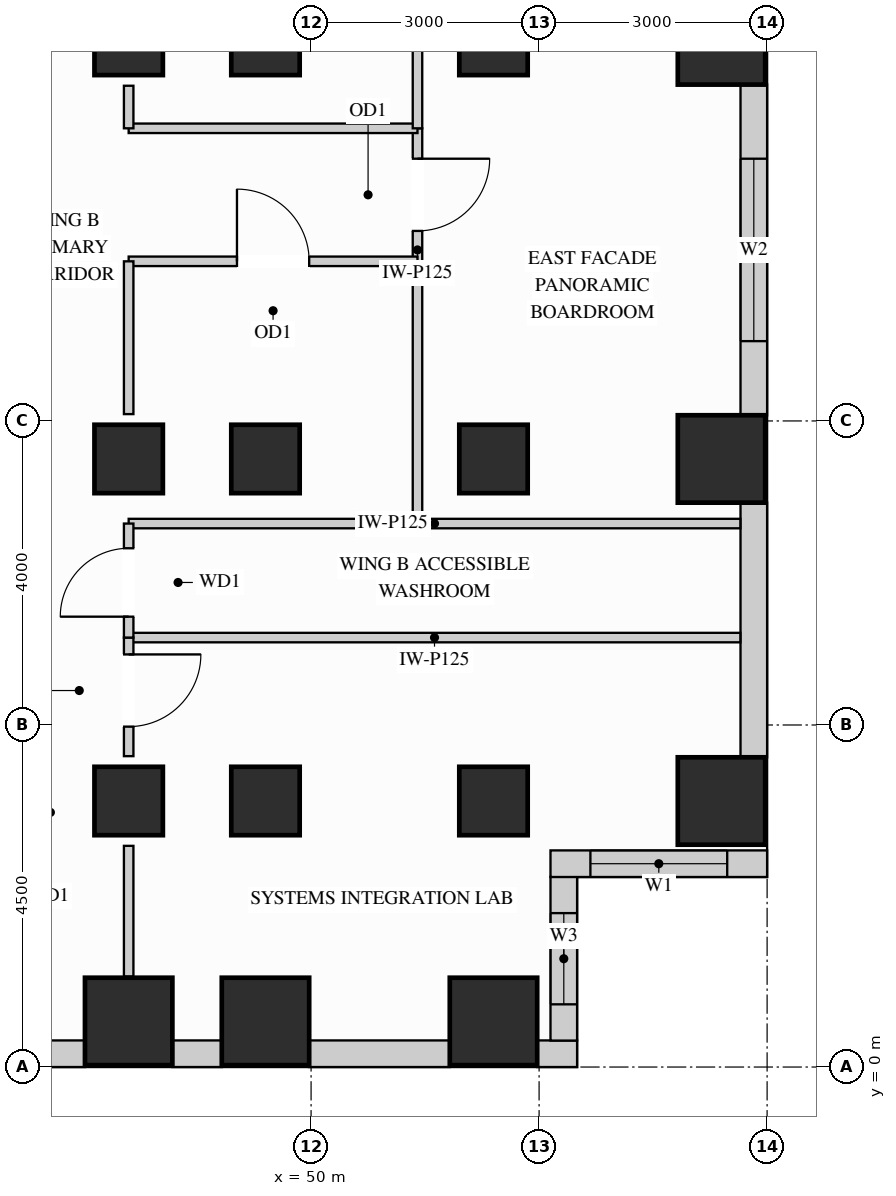
"""IFC4 building model, lengths in metres.
Left out: names, types, materials, properties, quantities, classifications, styles, units other than length and angle.
Written with IfcOpenShell. Run it as: python <this file> out.ifc"""

import sys

from ifc_helpers import new_model, si_unit, direction, frame, frame_2d, origin, origin_2d, place, context, subcontext, project, spatial, rectangle, extrude, source, transform, mapped, element, fill, save


model = new_model("IFC4")
c1 = context("Model", 3, precision=1e-05, world=origin(), true_north=direction((0.0, 1.0)))
c2 = subcontext(c1, "Body", "Model", "MODEL_VIEW")
j1 = project(units=[si_unit("LENGTHUNIT", "METRE"), si_unit("PLANEANGLEUNIT", "RADIAN")], contexts=[c1])
p1 = place(None, origin())
s1 = spatial("IfcSite", under=j1, at=p1, CompositionType="ELEMENT")
p2 = place(p1, origin())
s2 = spatial("IfcBuilding", under=s1, at=p2, CompositionType="ELEMENT")
p3 = place(p2, frame((0.0, 0.0, 127.8)))
s3 = spatial("IfcBuildingStorey", under=s2, at=p3, CompositionType="ELEMENT", Elevation=127.8)
m1 = source(origin(), c2, "Body", "SweptSolid", [
    extrude(rectangle(XDim=0.9, YDim=0.9, at=origin_2d()), origin(), (0.0, 0.0, 1.0), 3.38),
])
for number, where, z_axis, x_axis in (
    (1, (47.6, 13.5, 0.0), (0.0, 0.0, 1.0), (1.0, 0.0, 0.0)),
    (2, (47.6, 3.5, 0.0), (0.0, 0.0, 1.0), (1.0, 0.0, 0.0)),
    (3, (47.6, 8.0, 0.0), (0.0, 0.0, 1.0), (1.0, 0.0, 0.0)),
    (4, (49.4, 13.5, 0.0), (0.0, 0.0, 1.0), (1.0, 0.0, 0.0)),
    (5, (49.4, 3.5, 0.0), (0.0, 0.0, 1.0), (1.0, 0.0, 0.0)),
    (6, (49.4, 8.0, 0.0), (0.0, 0.0, 1.0), (1.0, 0.0, 0.0)),
    (7, (52.4, 13.5, 0.0), (0.0, 0.0, 1.0), (1.0, 0.0, 0.0)),
    (8, (52.4, 3.5, 0.0), (0.0, 0.0, 1.0), (1.0, 0.0, 0.0)),
    (9, (52.4, 8.0, 0.0), (0.0, 0.0, 1.0), (1.0, 0.0, 0.0)),
):
    element("IfcColumn", number, at=place(p3, frame(where, z_axis=z_axis, x_axis=x_axis)), inside=s3, PredefinedType="COLUMN", context=c2, shape_type="MappedRepresentation", body=[
        mapped(m1, transform((0.0, 0.0, 0.0), x_axis=(1.0, 0.0, 0.0), y_axis=(0.0, 1.0, 0.0), z_axis=(0.0, 0.0, 1.0))),
    ])
m2 = source(origin(), c2, "Body", "SweptSolid", [
    extrude(rectangle(XDim=1.15, YDim=1.15, at=origin_2d()), origin(), (0.0, 0.0, 1.0), 3.38),
])
for number, where, z_axis, x_axis in (
    (10, (55.4, 13.5, 0.0), (0.0, 0.0, 1.0), (1.0, 0.0, 0.0)),
    (11, (55.4, 3.5, 0.0), (0.0, 0.0, 1.0), (1.0, 0.0, 0.0)),
    (12, (55.4, 8.0, 0.0), (0.0, 0.0, 1.0), (1.0, 0.0, 0.0)),
    (13, (47.6, 0.6, 0.0), (0.0, 0.0, 1.0), (1.0, 0.0, 0.0)),
    (14, (49.4, 0.6, 0.0), (0.0, 0.0, 1.0), (1.0, 0.0, 0.0)),
    (15, (52.4, 0.6, 0.0), (0.0, 0.0, 1.0), (1.0, 0.0, 0.0)),
):
    element("IfcColumn", number, at=place(p3, frame(where, z_axis=z_axis, x_axis=x_axis)), inside=s3, PredefinedType="COLUMN", context=c2, shape_type="MappedRepresentation", body=[
        mapped(m2, transform((0.0, 0.0, 0.0), x_axis=(1.0, 0.0, 0.0), y_axis=(0.0, 1.0, 0.0), z_axis=(0.0, 0.0, 1.0))),
    ])
p4 = place(p3, frame((40.573, 0.175, 0.0), z_axis=(0.0, 0.0, 1.0), x_axis=(1.0, 0.0, 0.0)))
e16 = element("IfcWall", 16, at=p4, inside=s3, PredefinedType="SOLIDWALL", context=c2, shape_type="SweptSolid", body=[
    extrude(rectangle(XDim=6.454, YDim=0.35, at=frame_2d((3.227, 0.0))), origin(), (0.0, 0.0, 1.0), 3.365),
])
p5 = place(p4, frame((0.712, 0.0, 0.78)))
e17 = element("IfcOpeningElement", 17, at=p5, cuts=e16, PredefinedType="OPENING", context=c2, shape_type="SweptSolid", body=[
    extrude(rectangle(XDim=1.8, YDim=2.1, at=frame_2d((0.9, 1.05))), frame((0.0, 0.185, 0.0), z_axis=(0.0, -1.0, 0.0), x_axis=(1.0, 0.0, 0.0)), (0.0, 0.0, 1.0), 0.37),
])
p6 = place(p4, frame((2.905, 0.0, 0.78)))
e18 = element("IfcOpeningElement", 18, at=p6, cuts=e16, PredefinedType="OPENING", context=c2, shape_type="SweptSolid", body=[
    extrude(rectangle(XDim=1.8, YDim=2.1, at=frame_2d((0.9, 1.05))), frame((0.0, 0.185, 0.0), z_axis=(0.0, -1.0, 0.0), x_axis=(1.0, 0.0, 0.0)), (0.0, 0.0, 1.0), 0.37),
])
m3 = source(origin(), c2, "Body", "SweptSolid", [
    extrude(rectangle(XDim=0.654, YDim=0.35, at=frame_2d((0.327, 0.0))), origin(), (0.0, 0.0, 1.0), 3.365),
])
p7 = place(p3, frame((48.173, 0.175, 0.0), z_axis=(0.0, 0.0, 1.0), x_axis=(1.0, 0.0, 0.0)))
e19 = element("IfcWall", 19, at=p7, inside=s3, PredefinedType="SOLIDWALL", context=c2, shape_type="MappedRepresentation", body=[
    mapped(m3, transform((0.0, 0.0, 0.0), x_axis=(1.0, 0.0, 0.0), y_axis=(0.0, 1.0, 0.0), z_axis=(0.0, 0.0, 1.0))),
])
m4 = source(origin(), c2, "Body", "SweptSolid", [
    extrude(rectangle(XDim=1.854, YDim=0.35, at=frame_2d((0.927, 0.0))), origin(), (0.0, 0.0, 1.0), 3.365),
])
p8 = place(p3, frame((49.973, 0.175, 0.0), z_axis=(0.0, 0.0, 1.0), x_axis=(1.0, 0.0, 0.0)))
e20 = element("IfcWall", 20, at=p8, inside=s3, PredefinedType="SOLIDWALL", context=c2, shape_type="MappedRepresentation", body=[
    mapped(m4, transform((0.0, 0.0, 0.0), x_axis=(1.0, 0.0, 0.0), y_axis=(0.0, 1.0, 0.0), z_axis=(0.0, 0.0, 1.0))),
])
m5 = source(origin(), c2, "Body", "SweptSolid", [
    extrude(rectangle(XDim=0.527, YDim=0.35, at=frame_2d((0.264, 0.0))), origin(), (0.0, 0.0, 1.0), 3.365),
])
p9 = place(p3, frame((52.973, 0.175, 0.0), z_axis=(0.0, 0.0, 1.0), x_axis=(1.0, 0.0, 0.0)))
e21 = element("IfcWall", 21, at=p9, inside=s3, PredefinedType="SOLIDWALL", context=c2, shape_type="MappedRepresentation", body=[
    mapped(m5, transform((0.0, 0.0, 0.0), x_axis=(1.0, 0.0, 0.0), y_axis=(0.0, 1.0, 0.0), z_axis=(0.0, 0.0, 1.0))),
])
p10 = place(p3, frame((53.325, 0.348, 0.0), z_axis=(0.0, 0.0, 1.0), x_axis=(0.0, 1.0, 0.0)))
e22 = element("IfcWall", 22, at=p10, inside=s3, PredefinedType="SOLIDWALL", context=c2, shape_type="SweptSolid", body=[
    extrude(rectangle(XDim=2.154, YDim=0.35, at=frame_2d((1.077, 0.0))), origin(), (0.0, 0.0, 1.0), 3.365),
])
p11 = place(p10, frame((0.477, 0.0, 0.78)))
e23 = element("IfcOpeningElement", 23, at=p11, cuts=e22, PredefinedType="OPENING", context=c2, shape_type="SweptSolid", body=[
    extrude(rectangle(XDim=1.2, YDim=2.1, at=frame_2d((0.6, 1.05))), frame((0.0, 0.185, 0.0), z_axis=(0.0, -1.0, 0.0), x_axis=(1.0, 0.0, 0.0)), (0.0, 0.0, 1.0), 0.37),
])
p12 = place(p3, frame((53.15, 2.675, 0.0), z_axis=(0.0, 0.0, 1.0), x_axis=(1.0, 0.0, 0.0)))
e24 = element("IfcWall", 24, at=p12, inside=s3, PredefinedType="SOLIDWALL", context=c2, shape_type="SweptSolid", body=[
    extrude(rectangle(XDim=2.85, YDim=0.35, at=frame_2d((1.425, 0.0))), origin(), (0.0, 0.0, 1.0), 3.365),
])
p13 = place(p12, frame((0.525, 0.0, 0.78)))
e25 = element("IfcOpeningElement", 25, at=p13, cuts=e24, PredefinedType="OPENING", context=c2, shape_type="SweptSolid", body=[
    extrude(rectangle(XDim=1.8, YDim=2.1, at=frame_2d((0.9, 1.05))), frame((0.0, 0.185, 0.0), z_axis=(0.0, -1.0, 0.0), x_axis=(1.0, 0.0, 0.0)), (0.0, 0.0, 1.0), 0.37),
])
m6 = source(origin(), c2, "Body", "SweptSolid", [
    extrude(rectangle(XDim=3.354, YDim=0.35, at=frame_2d((1.677, 0.0))), origin(), (0.0, 0.0, 1.0), 3.365),
])
p14 = place(p3, frame((55.825, 4.073, 0.0), z_axis=(0.0, 0.0, 1.0), x_axis=(0.0, 1.0, 0.0)))
e26 = element("IfcWall", 26, at=p14, inside=s3, PredefinedType="SOLIDWALL", context=c2, shape_type="MappedRepresentation", body=[
    mapped(m6, transform((0.0, 0.0, 0.0), x_axis=(1.0, 0.0, 0.0), y_axis=(0.0, 1.0, 0.0), z_axis=(0.0, 0.0, 1.0))),
])
p15 = place(p3, frame((55.825, 8.573, 0.0), z_axis=(0.0, 0.0, 1.0), x_axis=(0.0, 1.0, 0.0)))
e27 = element("IfcWall", 27, at=p15, inside=s3, PredefinedType="SOLIDWALL", context=c2, shape_type="SweptSolid", body=[
    extrude(rectangle(XDim=4.354, YDim=0.35, at=frame_2d((2.177, 0.0))), origin(), (0.0, 0.0, 1.0), 3.365),
])
p16 = place(p15, frame((0.977, 0.0, 0.78)))
e28 = element("IfcOpeningElement", 28, at=p16, cuts=e27, PredefinedType="OPENING", context=c2, shape_type="SweptSolid", body=[
    extrude(rectangle(XDim=2.4, YDim=2.1, at=frame_2d((1.2, 1.05))), frame((0.0, 0.185, 0.0), z_axis=(0.0, -1.0, 0.0), x_axis=(1.0, 0.0, 0.0)), (0.0, 0.0, 1.0), 0.37),
])
p17 = place(p3, frame((51.4, 10.6, 0.0), z_axis=(0.0, 0.0, 1.0), x_axis=(0.0, 1.0, 0.0)))
e29 = element("IfcWall", 29, at=p17, inside=s3, PredefinedType="PARTITIONING", context=c2, shape_type="SweptSolid", body=[
    extrude(rectangle(XDim=1.75, YDim=0.125, at=frame_2d((0.875, 0.0))), origin(), (0.0, 0.0, 1.0), 3.365),
])
p18 = place(p17, frame((0.4, 0.0, 0.0)))
e30 = element("IfcOpeningElement", 30, at=p18, cuts=e29, PredefinedType="OPENING", context=c2, shape_type="SweptSolid", body=[
    extrude(rectangle(XDim=0.95, YDim=2.15, at=frame_2d((0.475, 1.075))), frame((0.0, 0.073, 0.0), z_axis=(0.0, -1.0, 0.0), x_axis=(1.0, 0.0, 0.0)), (0.0, 0.0, 1.0), 0.145),
])
m7 = source(origin(), c2, "Body", "SweptSolid", [
    extrude(rectangle(XDim=8.048, YDim=0.125, at=frame_2d((4.024, 0.0))), origin(), (0.0, 0.0, 1.0), 3.365),
])
for number, where, z_axis, x_axis in (
    (31, (47.6, 5.65, 0.0), (0.0, 0.0, 1.0), (1.0, 0.0, 0.0)),
    (32, (47.6, 7.15, 0.0), (0.0, 0.0, 1.0), (1.0, 0.0, 0.0)),
):
    element("IfcWall", number, at=place(p3, frame(where, z_axis=z_axis, x_axis=x_axis)), inside=s3, PredefinedType="PARTITIONING", context=c2, shape_type="MappedRepresentation", body=[
        mapped(m7, transform((0.0, 0.0, 0.0), x_axis=(1.0, 0.0, 0.0), y_axis=(0.0, 1.0, 0.0), z_axis=(0.0, 0.0, 1.0))),
    ])
m8 = source(origin(), c2, "Body", "SweptSolid", [
    extrude(rectangle(XDim=3.8, YDim=0.125, at=frame_2d((1.9, 0.0))), origin(), (0.0, 0.0, 1.0), 3.365),
])
p19 = place(p3, frame((47.6, 12.35, 0.0), z_axis=(0.0, 0.0, 1.0), x_axis=(1.0, 0.0, 0.0)))
e33 = element("IfcWall", 33, at=p19, inside=s3, PredefinedType="PARTITIONING", context=c2, shape_type="MappedRepresentation", body=[
    mapped(m8, transform((0.0, 0.0, 0.0), x_axis=(1.0, 0.0, 0.0), y_axis=(0.0, 1.0, 0.0), z_axis=(0.0, 0.0, 1.0))),
])
p20 = place(p3, frame((47.6, 10.6, 0.0), z_axis=(0.0, 0.0, 1.0), x_axis=(1.0, 0.0, 0.0)))
e34 = element("IfcWall", 34, at=p20, inside=s3, PredefinedType="PARTITIONING", context=c2, shape_type="SweptSolid", body=[
    extrude(rectangle(XDim=3.8, YDim=0.125, at=frame_2d((1.9, 0.0))), origin(), (0.0, 0.0, 1.0), 2.677),
])
p21 = place(p20, frame((1.425, 0.0, 0.0)))
e35 = element("IfcOpeningElement", 35, at=p21, cuts=e34, PredefinedType="OPENING", context=c2, shape_type="SweptSolid", body=[
    extrude(rectangle(XDim=0.95, YDim=2.15, at=frame_2d((0.475, 1.075))), frame((0.0, 0.073, 0.0), z_axis=(0.0, -1.0, 0.0), x_axis=(1.0, 0.0, 0.0)), (0.0, 0.0, 1.0), 0.145),
])
m9 = source(origin(), c2, "Body", "SweptSolid", [
    extrude(rectangle(XDim=3.45, YDim=0.125, at=frame_2d((1.725, 0.0))), origin(), (0.0, 0.0, 1.0), 3.365),
])
p22 = place(p3, frame((51.4, 7.15, 0.0), z_axis=(0.0, 0.0, 1.0), x_axis=(0.0, 1.0, 0.0)))
e36 = element("IfcWall", 36, at=p22, inside=s3, PredefinedType="PARTITIONING", context=c2, shape_type="MappedRepresentation", body=[
    mapped(m9, transform((0.0, 0.0, 0.0), x_axis=(1.0, 0.0, 0.0), y_axis=(0.0, 1.0, 0.0), z_axis=(0.0, 0.0, 1.0))),
])
m10 = source(origin(), c2, "Body", "SweptSolid", [
    extrude(rectangle(XDim=9.79, YDim=0.125, at=frame_2d((4.895, 0.0))), origin(), (0.0, 0.0, 1.0), 3.365),
])
p23 = place(p3, frame((51.4, 12.35, 0.0), z_axis=(0.0, 0.0, 1.0), x_axis=(0.0, 1.0, 0.0)))
e37 = element("IfcWall", 37, at=p23, inside=s3, PredefinedType="PARTITIONING", context=c2, shape_type="MappedRepresentation", body=[
    mapped(m10, transform((0.0, 0.0, 0.0), x_axis=(1.0, 0.0, 0.0), y_axis=(0.0, 1.0, 0.0), z_axis=(0.0, 0.0, 1.0))),
])
p24 = place(p3, frame((47.6, 4.09, 0.0), z_axis=(0.0, 0.0, 1.0), x_axis=(0.0, 1.0, 0.0)))
e38 = element("IfcWall", 38, at=p24, inside=s3, PredefinedType="PARTITIONING", context=c2, shape_type="SweptSolid", body=[
    extrude(rectangle(XDim=1.56, YDim=0.125, at=frame_2d((0.78, 0.0))), origin(), (0.0, 0.0, 1.0), 2.677),
])
p25 = place(p24, frame((0.388, 0.0, 0.0)))
e39 = element("IfcOpeningElement", 39, at=p25, cuts=e38, PredefinedType="OPENING", context=c2, shape_type="SweptSolid", body=[
    extrude(rectangle(XDim=0.95, YDim=2.15, at=frame_2d((0.475, 1.075))), frame((0.0, 0.073, 0.0), z_axis=(0.0, -1.0, 0.0), x_axis=(1.0, 0.0, 0.0)), (0.0, 0.0, 1.0), 0.145),
])
m11 = source(origin(), c2, "Body", "SweptSolid", [
    extrude(rectangle(XDim=1.72, YDim=0.125, at=frame_2d((0.86, 0.0))), origin(), (0.0, 0.0, 1.0), 2.677),
])
p26 = place(p3, frame((47.6, 1.19, 0.0), z_axis=(0.0, 0.0, 1.0), x_axis=(0.0, 1.0, 0.0)))
e40 = element("IfcWall", 40, at=p26, inside=s3, PredefinedType="PARTITIONING", context=c2, shape_type="MappedRepresentation", body=[
    mapped(m11, transform((0.0, 0.0, 0.0), x_axis=(1.0, 0.0, 0.0), y_axis=(0.0, 1.0, 0.0), z_axis=(0.0, 0.0, 1.0))),
])
m12 = source(origin(), c2, "Body", "SweptSolid", [
    extrude(rectangle(XDim=2.01, YDim=0.125, at=frame_2d((1.005, 0.0))), origin(), (0.0, 0.0, 1.0), 2.677),
])
p27 = place(p3, frame((47.6, 8.59, 0.0), z_axis=(0.0, 0.0, 1.0), x_axis=(0.0, 1.0, 0.0)))
e41 = element("IfcWall", 41, at=p27, inside=s3, PredefinedType="PARTITIONING", context=c2, shape_type="MappedRepresentation", body=[
    mapped(m12, transform((0.0, 0.0, 0.0), x_axis=(1.0, 0.0, 0.0), y_axis=(0.0, 1.0, 0.0), z_axis=(0.0, 0.0, 1.0))),
])
m13 = source(origin(), c2, "Body", "SweptSolid", [
    extrude(rectangle(XDim=0.56, YDim=0.125, at=frame_2d((0.28, 0.0))), origin(), (0.0, 0.0, 1.0), 2.677),
])
p28 = place(p3, frame((47.6, 12.35, 0.0), z_axis=(0.0, 0.0, 1.0), x_axis=(0.0, 1.0, 0.0)))
e42 = element("IfcWall", 42, at=p28, inside=s3, PredefinedType="PARTITIONING", context=c2, shape_type="MappedRepresentation", body=[
    mapped(m13, transform((0.0, 0.0, 0.0), x_axis=(1.0, 0.0, 0.0), y_axis=(0.0, 1.0, 0.0), z_axis=(0.0, 0.0, 1.0))),
])
p29 = place(p3, frame((47.6, 5.65, 0.0), z_axis=(0.0, 0.0, 1.0), x_axis=(0.0, 1.0, 0.0)))
e43 = element("IfcWall", 43, at=p29, inside=s3, PredefinedType="PARTITIONING", context=c2, shape_type="SweptSolid", body=[
    extrude(rectangle(XDim=1.5, YDim=0.125, at=frame_2d((0.75, 0.0))), origin(), (0.0, 0.0, 1.0), 2.677),
])
p30 = place(p29, frame((0.275, 0.0, 0.0)))
e44 = element("IfcOpeningElement", 44, at=p30, cuts=e43, PredefinedType="OPENING", context=c2, shape_type="SweptSolid", body=[
    extrude(rectangle(XDim=0.9, YDim=2.15, at=frame_2d((0.45, 1.075))), frame((0.0, 0.073, 0.0), z_axis=(0.0, -1.0, 0.0), x_axis=(1.0, 0.0, 0.0)), (0.0, 0.0, 1.0), 0.145),
])
m14 = source(origin(), c2, "Body", "SweptSolid", [
    extrude(rectangle(XDim=0.95, YDim=2.15, at=frame_2d((0.475, 1.075))), frame((0.0, 0.025, 0.0), z_axis=(0.0, -1.0, 0.0), x_axis=(1.0, 0.0, 0.0)), (0.0, 0.0, 1.0), 0.05),
])
p31 = place(p25, origin())
e45 = element("IfcDoor", 45, at=p31, inside=s3, OperationType="SINGLE_SWING_RIGHT", PredefinedType="DOOR", context=c2, shape_type="MappedRepresentation", body=[
    mapped(m14, transform((0.0, 0.0, 0.0), x_axis=(1.0, 0.0, 0.0), y_axis=(0.0, 1.0, 0.0), z_axis=(0.0, 0.0, 1.0))),
])
fill(e39, e45)
p32 = place(p21, origin())
e46 = element("IfcDoor", 46, at=p32, inside=s3, OperationType="SINGLE_SWING_LEFT", PredefinedType="DOOR", context=c2, shape_type="MappedRepresentation", body=[
    mapped(m14, transform((0.0, 0.0, 0.0), x_axis=(1.0, 0.0, 0.0), y_axis=(0.0, 1.0, 0.0), z_axis=(0.0, 0.0, 1.0))),
])
fill(e35, e46)
p33 = place(p18, origin())
e47 = element("IfcDoor", 47, at=p33, inside=s3, OperationType="SINGLE_SWING_RIGHT", PredefinedType="DOOR", context=c2, shape_type="MappedRepresentation", body=[
    mapped(m14, transform((0.0, 0.0, 0.0), x_axis=(1.0, 0.0, 0.0), y_axis=(0.0, 1.0, 0.0), z_axis=(0.0, 0.0, 1.0))),
])
fill(e30, e47)
m15 = source(origin(), c2, "Body", "SweptSolid", [
    extrude(rectangle(XDim=0.9, YDim=2.15, at=frame_2d((0.45, 1.075))), frame((0.0, 0.025, 0.0), z_axis=(0.0, -1.0, 0.0), x_axis=(1.0, 0.0, 0.0)), (0.0, 0.0, 1.0), 0.05),
])
p34 = place(p30, origin())
e48 = element("IfcDoor", 48, at=p34, inside=s3, OperationType="SINGLE_SWING_LEFT", PredefinedType="DOOR", context=c2, shape_type="MappedRepresentation", body=[
    mapped(m15, transform((0.0, 0.0, 0.0), x_axis=(1.0, 0.0, 0.0), y_axis=(0.0, 1.0, 0.0), z_axis=(0.0, 0.0, 1.0))),
])
fill(e44, e48)
m16 = source(origin(), c2, "Body", "SweptSolid", [
    extrude(rectangle(XDim=1.8, YDim=2.1, at=frame_2d((0.9, 1.05))), frame((0.0, 0.03, 0.0), z_axis=(0.0, -1.0, 0.0), x_axis=(1.0, 0.0, 0.0)), (0.0, 0.0, 1.0), 0.06),
])
p35 = place(p13, origin())
e49 = element("IfcWindow", 49, at=p35, inside=s3, PartitioningType="SINGLE_PANEL", PredefinedType="WINDOW", context=c2, shape_type="MappedRepresentation", body=[
    mapped(m16, transform((0.0, 0.0, 0.0), x_axis=(1.0, 0.0, 0.0), y_axis=(0.0, 1.0, 0.0), z_axis=(0.0, 0.0, 1.0))),
])
fill(e25, e49)
m17 = source(origin(), c2, "Body", "SweptSolid", [
    extrude(rectangle(XDim=2.4, YDim=2.1, at=frame_2d((1.2, 1.05))), frame((0.0, 0.03, 0.0), z_axis=(0.0, -1.0, 0.0), x_axis=(1.0, 0.0, 0.0)), (0.0, 0.0, 1.0), 0.06),
])
p36 = place(p16, origin())
e50 = element("IfcWindow", 50, at=p36, inside=s3, PartitioningType="SINGLE_PANEL", PredefinedType="WINDOW", context=c2, shape_type="MappedRepresentation", body=[
    mapped(m17, transform((0.0, 0.0, 0.0), x_axis=(1.0, 0.0, 0.0), y_axis=(0.0, 1.0, 0.0), z_axis=(0.0, 0.0, 1.0))),
])
fill(e28, e50)
m18 = source(origin(), c2, "Body", "SweptSolid", [
    extrude(rectangle(XDim=1.2, YDim=2.1, at=frame_2d((0.6, 1.05))), frame((0.0, 0.03, 0.0), z_axis=(0.0, -1.0, 0.0), x_axis=(1.0, 0.0, 0.0)), (0.0, 0.0, 1.0), 0.06),
])
p37 = place(p11, origin())
e51 = element("IfcWindow", 51, at=p37, inside=s3, PartitioningType="SINGLE_PANEL", PredefinedType="WINDOW", context=c2, shape_type="MappedRepresentation", body=[
    mapped(m18, transform((0.0, 0.0, 0.0), x_axis=(1.0, 0.0, 0.0), y_axis=(0.0, 1.0, 0.0), z_axis=(0.0, 0.0, 1.0))),
])
fill(e23, e51)
save(model, sys.argv[1])
